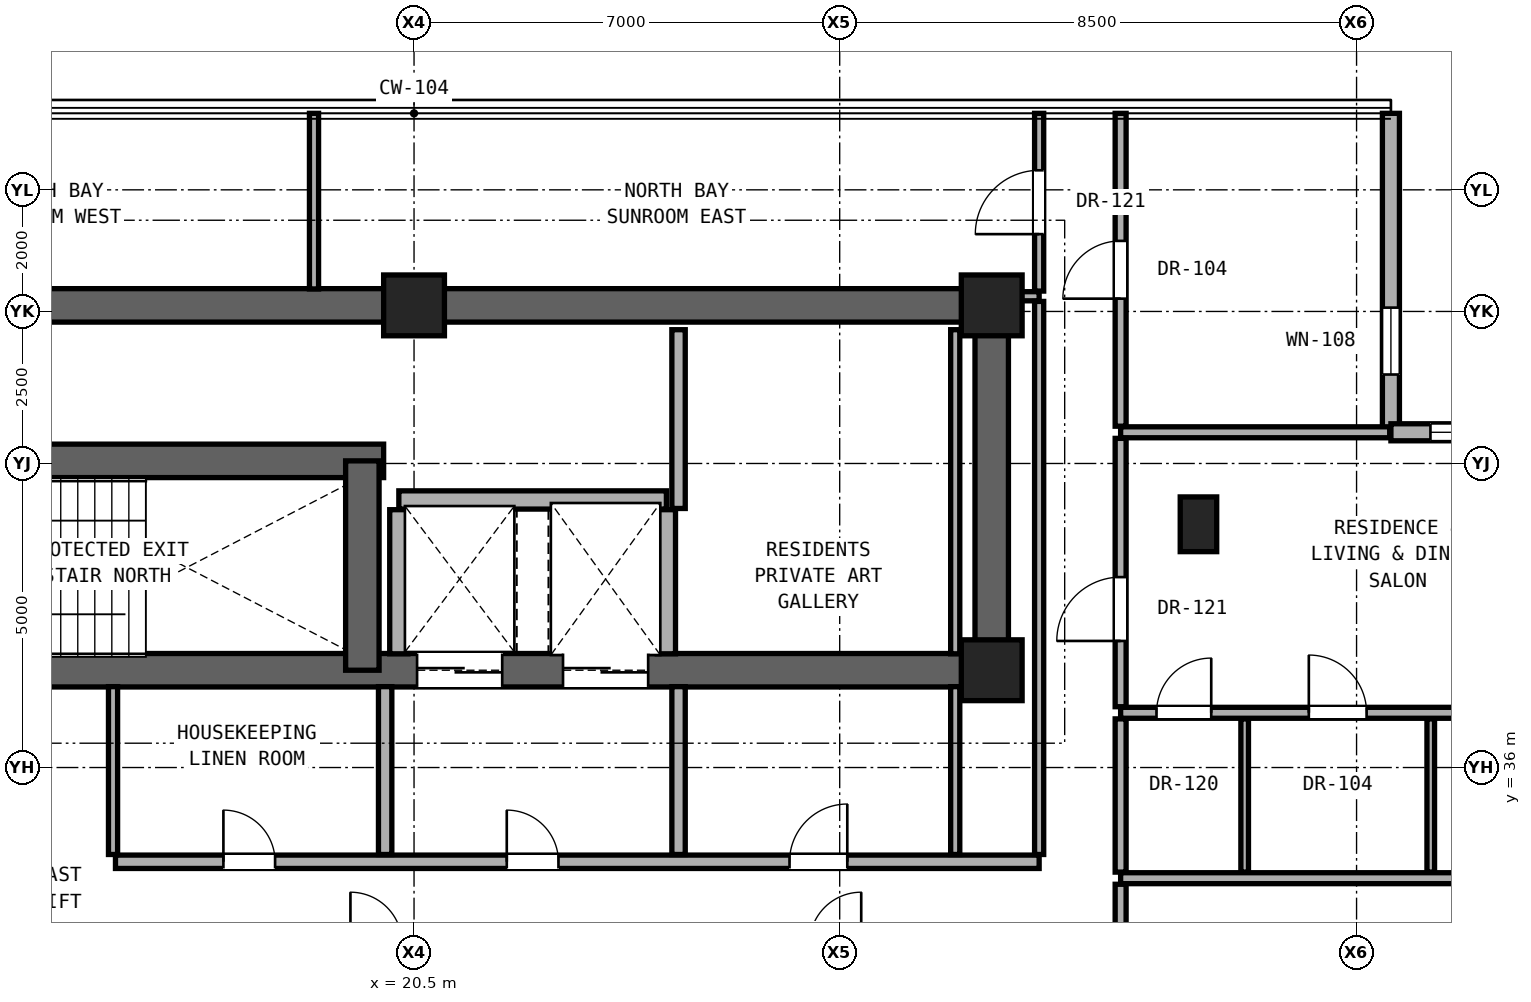
"""IFC4 building model, lengths in metres.
Left out: names, types, materials, properties, quantities, classifications, styles, units other than length and angle.
Written with IfcOpenShell. Run it as: python <this file> out.ifc"""

import sys

from ifc_helpers import new_model, si_unit, direction, frame, frame_2d, origin, origin_2d, place, context, subcontext, project, spatial, rectangle, extrude, element, fill, save


model = new_model("IFC4")
c1 = context("Model", 3, precision=1e-05, world=origin(), true_north=direction((0.0, 1.0)))
c2 = subcontext(c1, "Body", "Model", "MODEL_VIEW")
j1 = project(units=[si_unit("LENGTHUNIT", "METRE"), si_unit("PLANEANGLEUNIT", "RADIAN")], contexts=[c1])
p1 = place(None, origin())
s1 = spatial("IfcSite", under=j1, at=p1, CompositionType="ELEMENT")
p2 = place(p1, origin())
s2 = spatial("IfcBuilding", under=s1, at=p2, CompositionType="ELEMENT")
p3 = place(p2, frame((0.0, 0.0, 173.9)))
s3 = spatial("IfcBuildingStorey", under=s2, at=p3, CompositionType="ELEMENT", Elevation=173.9)
for number, where, z_axis, x_axis in (
    (1, (30.0, 37.6, 0.0), (0.0, 0.0, 1.0), (1.0, 0.0, 0.0)),
    (2, (20.5, 43.6, 0.0), (0.0, 0.0, 1.0), (1.0, 0.0, 0.0)),
    (3, (30.0, 43.6, 0.0), (0.0, 0.0, 1.0), (1.0, 0.0, 0.0)),
):
    element("IfcColumn", number, at=place(p3, frame(where, z_axis=z_axis, x_axis=x_axis)), inside=s3, PredefinedType="COLUMN", context=c2, shape_type="SweptSolid", body=[
        extrude(rectangle(XDim=1.0, YDim=1.0, at=origin_2d()), origin(), (0.0, 0.0, 1.0), 3.25),
    ])
p4 = place(p3, frame((33.4, 40.0, 0.0), z_axis=(0.0, 0.0, 1.0), x_axis=(1.0, 0.0, 0.0)))
e4 = element("IfcColumn", 4, at=p4, inside=s3, PredefinedType="PILASTER", context=c2, shape_type="SweptSolid", body=[
    extrude(rectangle(XDim=0.6, YDim=0.9, at=origin_2d()), origin(), (0.0, 0.0, 1.0), 3.25),
])
p5 = place(p3, frame((11.0, 43.6, 0.0), z_axis=(0.0, 0.0, 1.0), x_axis=(1.0, 0.0, 0.0)))
e5 = element("IfcWall", 5, at=p5, inside=s3, PredefinedType="SHEAR", context=c2, shape_type="SweptSolid", body=[
    extrude(rectangle(XDim=19.0, YDim=0.55, at=frame_2d((9.5, 0.0))), origin(), (0.0, 0.0, 1.0), 3.05),
])
p6 = place(p3, frame((30.0, 37.6, 0.0), z_axis=(0.0, 0.0, 1.0), x_axis=(0.0, 1.0, 0.0)))
e6 = element("IfcWall", 6, at=p6, inside=s3, PredefinedType="SHEAR", context=c2, shape_type="SweptSolid", body=[
    extrude(rectangle(XDim=6.0, YDim=0.55, at=frame_2d((3.0, 0.0))), origin(), (0.0, 0.0, 1.0), 3.05),
])
p7 = place(p3, frame((11.0, 37.6, 0.0), z_axis=(0.0, 0.0, 1.0), x_axis=(1.0, 0.0, 0.0)))
e7 = element("IfcWall", 7, at=p7, inside=s3, PredefinedType="SHEAR", context=c2, shape_type="SweptSolid", body=[
    extrude(rectangle(XDim=19.0, YDim=0.55, at=frame_2d((9.5, 0.0))), origin(), (0.0, 0.0, 1.0), 3.05),
])
p8 = place(p7, frame((1.06, 0.0, 0.0)))
e8 = element("IfcOpeningElement", 8, at=p8, cuts=e7, PredefinedType="OPENING", context=c2, shape_type="SweptSolid", body=[
    extrude(rectangle(XDim=1.15, YDim=2.2, at=frame_2d((0.575, 1.1))), frame((0.0, 0.285, 0.0), z_axis=(0.0, -1.0, 0.0), x_axis=(1.0, 0.0, 0.0)), (0.0, 0.0, 1.0), 0.57),
])
p9 = place(p7, frame((9.55, 0.0, 0.0)))
e9 = element("IfcOpeningElement", 9, at=p9, cuts=e7, PredefinedType="OPENING", context=c2, shape_type="SweptSolid", body=[
    extrude(rectangle(XDim=1.4, YDim=2.35, at=frame_2d((0.7, 1.175))), frame((0.0, 0.285, 0.0), z_axis=(0.0, -1.0, 0.0), x_axis=(1.0, 0.0, 0.0)), (0.0, 0.0, 1.0), 0.57),
])
p10 = place(p7, frame((11.95, 0.0, 0.0)))
e10 = element("IfcOpeningElement", 10, at=p10, cuts=e7, PredefinedType="OPENING", context=c2, shape_type="SweptSolid", body=[
    extrude(rectangle(XDim=1.4, YDim=2.35, at=frame_2d((0.7, 1.175))), frame((0.0, 0.285, 0.0), z_axis=(0.0, -1.0, 0.0), x_axis=(1.0, 0.0, 0.0)), (0.0, 0.0, 1.0), 0.57),
])
p11 = place(p3, frame((11.0, 41.043, 0.0), z_axis=(0.0, 0.0, 1.0), x_axis=(1.0, 0.0, 0.0)))
e11 = element("IfcWall", 11, at=p11, inside=s3, PredefinedType="SHEAR", context=c2, shape_type="SweptSolid", body=[
    extrude(rectangle(XDim=9.0, YDim=0.55, at=frame_2d((4.5, 0.0))), origin(), (0.0, 0.0, 1.0), 3.05),
])
p12 = place(p3, frame((19.65, 37.6, 0.0), z_axis=(0.0, 0.0, 1.0), x_axis=(0.0, 1.0, 0.0)))
e12 = element("IfcWall", 12, at=p12, inside=s3, PredefinedType="SHEAR", context=c2, shape_type="SweptSolid", body=[
    extrude(rectangle(XDim=3.443, YDim=0.55, at=frame_2d((1.721, 0.0))), origin(), (0.0, 0.0, 1.0), 3.05),
])
p13 = place(p3, frame((36.565, 41.513, 0.0), z_axis=(0.0, 0.0, 1.0), x_axis=(0.0, 1.0, 0.0)))
e13 = element("IfcWall", 13, at=p13, inside=s3, PredefinedType="SOLIDWALL", context=c2, shape_type="SweptSolid", body=[
    extrude(rectangle(XDim=5.245, YDim=0.28, at=frame_2d((2.623, 0.0))), origin(), (0.0, 0.0, 1.0), 3.03),
])
p14 = place(p13, frame((0.95, 0.0, 0.85)))
e14 = element("IfcOpeningElement", 14, at=p14, cuts=e13, PredefinedType="OPENING", context=c2, shape_type="SweptSolid", body=[
    extrude(rectangle(XDim=1.1, YDim=2.0, at=frame_2d((0.55, 1.0))), frame((0.0, 0.15, 0.0), z_axis=(0.0, -1.0, 0.0), x_axis=(1.0, 0.0, 0.0)), (0.0, 0.0, 1.0), 0.3),
])
p15 = place(p3, frame((41.81, 41.513, 0.0), z_axis=(0.0, 0.0, 1.0), x_axis=(-1.0, 0.0, 0.0)))
e15 = element("IfcWall", 15, at=p15, inside=s3, PredefinedType="SOLIDWALL", context=c2, shape_type="SweptSolid", body=[
    extrude(rectangle(XDim=5.245, YDim=0.28, at=frame_2d((2.623, 0.0))), origin(), (0.0, 0.0, 1.0), 3.03),
])
p16 = place(p15, frame((3.495, 0.0, 0.85)))
e16 = element("IfcOpeningElement", 16, at=p16, cuts=e15, PredefinedType="OPENING", context=c2, shape_type="SweptSolid", body=[
    extrude(rectangle(XDim=1.1, YDim=2.0, at=frame_2d((0.55, 1.0))), frame((0.0, 0.15, 0.0), z_axis=(0.0, -1.0, 0.0), x_axis=(1.0, 0.0, 0.0)), (0.0, 0.0, 1.0), 0.3),
])
p17 = place(p3, frame((32.12, 34.18, 0.0), z_axis=(0.0, 0.0, 1.0), x_axis=(1.0, 0.0, 0.0)))
e17 = element("IfcWall", 17, at=p17, inside=s3, PredefinedType="PARTITIONING", context=c2, shape_type="SweptSolid", body=[
    extrude(rectangle(XDim=9.69, YDim=0.18, at=frame_2d((4.845, 0.0))), origin(), (0.0, 0.0, 1.0), 2.269),
])
p18 = place(p3, frame((15.59, 34.45, 0.0), z_axis=(0.0, 0.0, 1.0), x_axis=(1.0, 0.0, 0.0)))
e18 = element("IfcWall", 18, at=p18, inside=s3, PredefinedType="SOLIDWALL", context=c2, shape_type="SweptSolid", body=[
    extrude(rectangle(XDim=15.19, YDim=0.22, at=frame_2d((7.595, 0.0))), origin(), (0.0, 0.0, 1.0), 2.186),
])
p19 = place(p18, frame((6.435, 0.0, 0.0)))
e19 = element("IfcOpeningElement", 19, at=p19, cuts=e18, PredefinedType="OPENING", context=c2, shape_type="SweptSolid", body=[
    extrude(rectangle(XDim=0.85, YDim=2.01, at=frame_2d((0.425, 1.005))), frame((0.0, 0.12, 0.0), z_axis=(0.0, -1.0, 0.0), x_axis=(1.0, 0.0, 0.0)), (0.0, 0.0, 1.0), 0.24),
])
p20 = place(p18, frame((11.085, 0.0, 0.0)))
e20 = element("IfcOpeningElement", 20, at=p20, cuts=e18, PredefinedType="OPENING", context=c2, shape_type="SweptSolid", body=[
    extrude(rectangle(XDim=0.95, YDim=2.15, at=frame_2d((0.475, 1.075))), frame((0.0, 0.12, 0.0), z_axis=(0.0, -1.0, 0.0), x_axis=(1.0, 0.0, 0.0)), (0.0, 0.0, 1.0), 0.24),
])
p21 = place(p18, frame((1.775, 0.0, 0.0)))
e21 = element("IfcOpeningElement", 21, at=p21, cuts=e18, PredefinedType="OPENING", context=c2, shape_type="SweptSolid", body=[
    extrude(rectangle(XDim=0.85, YDim=2.01, at=frame_2d((0.425, 1.005))), frame((0.0, 0.12, 0.0), z_axis=(0.0, -1.0, 0.0), x_axis=(1.0, 0.0, 0.0)), (0.0, 0.0, 1.0), 0.24),
])
p22 = place(p3, frame((32.12, 36.9, 0.0), z_axis=(0.0, 0.0, 1.0), x_axis=(1.0, 0.0, 0.0)))
e22 = element("IfcWall", 22, at=p22, inside=s3, PredefinedType="PARTITIONING", context=c2, shape_type="SweptSolid", body=[
    extrude(rectangle(XDim=9.69, YDim=0.18, at=frame_2d((4.845, 0.0))), origin(), (0.0, 0.0, 1.0), 2.269),
])
p23 = place(p22, frame((7.5, 0.0, 0.0)))
e23 = element("IfcOpeningElement", 23, at=p23, cuts=e22, PredefinedType="OPENING", context=c2, shape_type="SweptSolid", body=[
    extrude(rectangle(XDim=0.95, YDim=2.15, at=frame_2d((0.475, 1.075))), frame((0.0, 0.1, 0.0), z_axis=(0.0, -1.0, 0.0), x_axis=(1.0, 0.0, 0.0)), (0.0, 0.0, 1.0), 0.2),
])
p24 = place(p22, frame((3.095, 0.0, 0.0)))
e24 = element("IfcOpeningElement", 24, at=p24, cuts=e22, PredefinedType="OPENING", context=c2, shape_type="SweptSolid", body=[
    extrude(rectangle(XDim=0.95, YDim=2.15, at=frame_2d((0.475, 1.075))), frame((0.0, 0.1, 0.0), z_axis=(0.0, -1.0, 0.0), x_axis=(1.0, 0.0, 0.0)), (0.0, 0.0, 1.0), 0.2),
])
p25 = place(p22, frame((0.59, 0.0, 0.0)))
e25 = element("IfcOpeningElement", 25, at=p25, cuts=e22, PredefinedType="OPENING", context=c2, shape_type="SweptSolid", body=[
    extrude(rectangle(XDim=0.9, YDim=2.1, at=frame_2d((0.45, 1.05))), frame((0.0, 0.1, 0.0), z_axis=(0.0, -1.0, 0.0), x_axis=(1.0, 0.0, 0.0)), (0.0, 0.0, 1.0), 0.2),
])
p26 = place(p3, frame((20.25, 40.4, 0.0), z_axis=(0.0, 0.0, 1.0), x_axis=(1.0, 0.0, 0.0)))
e26 = element("IfcWall", 26, at=p26, inside=s3, PredefinedType="SOLIDWALL", context=c2, shape_type="SweptSolid", body=[
    extrude(rectangle(XDim=4.4, YDim=0.3, at=frame_2d((2.2, 0.0))), origin(), (0.0, 0.0, 1.0), 3.05),
])
p27 = place(p3, frame((32.12, 41.513, 0.0), z_axis=(0.0, 0.0, 1.0), x_axis=(1.0, 0.0, 0.0)))
e27 = element("IfcWall", 27, at=p27, inside=s3, PredefinedType="PARTITIONING", context=c2, shape_type="SweptSolid", body=[
    extrude(rectangle(XDim=4.425, YDim=0.18, at=frame_2d((2.212, 0.0))), origin(), (0.0, 0.0, 1.0), 3.05),
])
p28 = place(p3, frame((30.27, 43.75, 0.0), z_axis=(0.0, 0.0, 1.0), x_axis=(1.0, 0.0, 0.0)))
e28 = element("IfcWall", 28, at=p28, inside=s3, PredefinedType="PARTITIONING", context=c2, shape_type="SweptSolid", body=[
    extrude(rectangle(XDim=0.51, YDim=0.15, at=frame_2d((0.255, 0.0))), origin(), (0.0, 0.0, 1.0), 3.05),
])
p29 = place(p3, frame((15.55, 34.57, 0.0), z_axis=(0.0, 0.0, 1.0), x_axis=(0.0, 1.0, 0.0)))
e29 = element("IfcWall", 29, at=p29, inside=s3, PredefinedType="PARTITIONING", context=c2, shape_type="SweptSolid", body=[
    extrude(rectangle(XDim=2.76, YDim=0.15, at=frame_2d((1.38, 0.0))), origin(), (0.0, 0.0, 1.0), 3.05),
])
p30 = place(p3, frame((18.855, 43.87, 0.0), z_axis=(0.0, 0.0, 1.0), x_axis=(0.0, 1.0, 0.0)))
e30 = element("IfcWall", 30, at=p30, inside=s3, PredefinedType="PARTITIONING", context=c2, shape_type="SweptSolid", body=[
    extrude(rectangle(XDim=2.888, YDim=0.15, at=frame_2d((1.444, 0.0))), origin(), (0.0, 0.0, 1.0), 3.05),
])
p31 = place(p3, frame((20.025, 34.57, 0.0), z_axis=(0.0, 0.0, 1.0), x_axis=(0.0, 1.0, 0.0)))
e31 = element("IfcWall", 31, at=p31, inside=s3, PredefinedType="SOLIDWALL", context=c2, shape_type="SweptSolid", body=[
    extrude(rectangle(XDim=2.76, YDim=0.22, at=frame_2d((1.38, 0.0))), origin(), (0.0, 0.0, 1.0), 3.05),
])
for number, where, z_axis, x_axis in (
    (32, (20.25, 37.87, 0.0), (0.0, 0.0, 1.0), (0.0, 1.0, 0.0)),
    (33, (24.65, 37.87, 0.0), (0.0, 0.0, 1.0), (0.0, 1.0, 0.0)),
):
    element("IfcWall", number, at=place(p3, frame(where, z_axis=z_axis, x_axis=x_axis)), inside=s3, PredefinedType="SOLIDWALL", context=c2, shape_type="SweptSolid", body=[
        extrude(rectangle(XDim=2.37, YDim=0.3, at=frame_2d((1.185, 0.0))), origin(), (0.0, 0.0, 1.0), 3.05),
    ])
p32 = place(p3, frame((24.85, 34.57, 0.0), z_axis=(0.0, 0.0, 1.0), x_axis=(0.0, 1.0, 0.0)))
e34 = element("IfcWall", 34, at=p32, inside=s3, PredefinedType="SOLIDWALL", context=c2, shape_type="SweptSolid", body=[
    extrude(rectangle(XDim=2.76, YDim=0.22, at=frame_2d((1.38, 0.0))), origin(), (0.0, 0.0, 1.0), 3.05),
])
p33 = place(p3, frame((24.85, 40.26, 0.0), z_axis=(0.0, 0.0, 1.0), x_axis=(0.0, 1.0, 0.0)))
e35 = element("IfcWall", 35, at=p33, inside=s3, PredefinedType="SOLIDWALL", context=c2, shape_type="SweptSolid", body=[
    extrude(rectangle(XDim=2.94, YDim=0.22, at=frame_2d((1.47, 0.0))), origin(), (0.0, 0.0, 1.0), 3.05),
])
p34 = place(p3, frame((29.4, 34.57, 0.0), z_axis=(0.0, 0.0, 1.0), x_axis=(0.0, 1.0, 0.0)))
e36 = element("IfcWall", 36, at=p34, inside=s3, PredefinedType="PARTITIONING", context=c2, shape_type="SweptSolid", body=[
    extrude(rectangle(XDim=2.76, YDim=0.15, at=frame_2d((1.38, 0.0))), origin(), (0.0, 0.0, 1.0), 3.05),
])
p35 = place(p3, frame((29.4, 37.87, 0.0), z_axis=(0.0, 0.0, 1.0), x_axis=(0.0, 1.0, 0.0)))
e37 = element("IfcWall", 37, at=p35, inside=s3, PredefinedType="PARTITIONING", context=c2, shape_type="SweptSolid", body=[
    extrude(rectangle(XDim=5.33, YDim=0.15, at=frame_2d((2.665, 0.0))), origin(), (0.0, 0.0, 1.0), 3.05),
])
p36 = place(p3, frame((30.78, 34.57, 0.0), z_axis=(0.0, 0.0, 1.0), x_axis=(0.0, 1.0, 0.0)))
e38 = element("IfcWall", 38, at=p36, inside=s3, PredefinedType="PARTITIONING", context=c2, shape_type="SweptSolid", body=[
    extrude(rectangle(XDim=9.095, YDim=0.15, at=frame_2d((4.547, 0.0))), origin(), (0.0, 0.0, 1.0), 2.442),
])
p37 = place(p3, frame((30.78, 43.835, 0.0), z_axis=(0.0, 0.0, 1.0), x_axis=(0.0, 1.0, 0.0)))
e39 = element("IfcWall", 39, at=p37, inside=s3, PredefinedType="PARTITIONING", context=c2, shape_type="SweptSolid", body=[
    extrude(rectangle(XDim=2.923, YDim=0.15, at=frame_2d((1.461, 0.0))), origin(), (0.0, 0.0, 1.0), 3.05),
])
p38 = place(p37, frame((0.937, 0.0, 0.0)))
e40 = element("IfcOpeningElement", 40, at=p38, cuts=e39, PredefinedType="OPENING", context=c2, shape_type="SweptSolid", body=[
    extrude(rectangle(XDim=1.05, YDim=2.2, at=frame_2d((0.525, 1.1))), frame((0.0, 0.085, 0.0), z_axis=(0.0, -1.0, 0.0), x_axis=(1.0, 0.0, 0.0)), (0.0, 0.0, 1.0), 0.17),
])
p39 = place(p3, frame((32.12, 30.633, 0.0), z_axis=(0.0, 0.0, 1.0), x_axis=(0.0, 1.0, 0.0)))
e41 = element("IfcWall", 41, at=p39, inside=s3, PredefinedType="PARTITIONING", context=c2, shape_type="SweptSolid", body=[
    extrude(rectangle(XDim=3.447, YDim=0.18, at=frame_2d((1.724, 0.0))), origin(), (0.0, 0.0, 1.0), 2.346),
])
p40 = place(p39, frame((1.198, 0.0, 0.0)))
e42 = element("IfcOpeningElement", 42, at=p40, cuts=e41, PredefinedType="OPENING", context=c2, shape_type="SweptSolid", body=[
    extrude(rectangle(XDim=1.05, YDim=2.2, at=frame_2d((0.525, 1.1))), frame((0.0, 0.1, 0.0), z_axis=(0.0, -1.0, 0.0), x_axis=(1.0, 0.0, 0.0)), (0.0, 0.0, 1.0), 0.2),
])
p41 = place(p3, frame((32.12, 34.28, 0.0), z_axis=(0.0, 0.0, 1.0), x_axis=(0.0, 1.0, 0.0)))
e43 = element("IfcWall", 43, at=p41, inside=s3, PredefinedType="PARTITIONING", context=c2, shape_type="SweptSolid", body=[
    extrude(rectangle(XDim=2.52, YDim=0.18, at=frame_2d((1.26, 0.0))), origin(), (0.0, 0.0, 1.0), 3.05),
])
p42 = place(p3, frame((32.12, 37.0, 0.0), z_axis=(0.0, 0.0, 1.0), x_axis=(0.0, 1.0, 0.0)))
e44 = element("IfcWall", 44, at=p42, inside=s3, PredefinedType="PARTITIONING", context=c2, shape_type="SweptSolid", body=[
    extrude(rectangle(XDim=4.413, YDim=0.18, at=frame_2d((2.207, 0.0))), origin(), (0.0, 0.0, 1.0), 2.442),
])
p43 = place(p42, frame((1.082, 0.0, 0.0)))
e45 = element("IfcOpeningElement", 45, at=p43, cuts=e44, PredefinedType="OPENING", context=c2, shape_type="SweptSolid", body=[
    extrude(rectangle(XDim=1.05, YDim=2.2, at=frame_2d((0.525, 1.1))), frame((0.0, 0.1, 0.0), z_axis=(0.0, -1.0, 0.0), x_axis=(1.0, 0.0, 0.0)), (0.0, 0.0, 1.0), 0.2),
])
p44 = place(p3, frame((32.12, 41.613, 0.0), z_axis=(0.0, 0.0, 1.0), x_axis=(0.0, 1.0, 0.0)))
e46 = element("IfcWall", 46, at=p44, inside=s3, PredefinedType="PARTITIONING", context=c2, shape_type="SweptSolid", body=[
    extrude(rectangle(XDim=5.145, YDim=0.18, at=frame_2d((2.573, 0.0))), origin(), (0.0, 0.0, 1.0), 3.05),
])
p45 = place(p44, frame((2.097, 0.0, 0.0)))
e47 = element("IfcOpeningElement", 47, at=p45, cuts=e46, PredefinedType="OPENING", context=c2, shape_type="SweptSolid", body=[
    extrude(rectangle(XDim=0.95, YDim=2.15, at=frame_2d((0.475, 1.075))), frame((0.0, 0.1, 0.0), z_axis=(0.0, -1.0, 0.0), x_axis=(1.0, 0.0, 0.0)), (0.0, 0.0, 1.0), 0.2),
])
for number, where, z_axis, x_axis in (
    (48, (34.16, 34.28, 0.0), (0.0, 0.0, 1.0), (0.0, 1.0, 0.0)),
    (49, (37.22, 34.28, 0.0), (0.0, 0.0, 1.0), (0.0, 1.0, 0.0)),
):
    element("IfcWall", number, at=place(p3, frame(where, z_axis=z_axis, x_axis=x_axis)), inside=s3, PredefinedType="PARTITIONING", context=c2, shape_type="SweptSolid", body=[
        extrude(rectangle(XDim=2.52, YDim=0.125, at=frame_2d((1.26, 0.0))), origin(), (0.0, 0.0, 1.0), 3.05),
    ])
p46 = place(p14, origin())
e50 = element("IfcWindow", 50, at=p46, inside=s3, PartitioningType="SINGLE_PANEL", PredefinedType="WINDOW", context=c2, shape_type="SweptSolid", body=[
    extrude(rectangle(XDim=1.1, YDim=2.0, at=frame_2d((0.55, 1.0))), frame((0.0, 0.03, 0.0), z_axis=(0.0, -1.0, 0.0), x_axis=(1.0, 0.0, 0.0)), (0.0, 0.0, 1.0), 0.06),
])
fill(e14, e50)
p47 = place(p16, origin())
e51 = element("IfcWindow", 51, at=p47, inside=s3, PartitioningType="SINGLE_PANEL", PredefinedType="WINDOW", context=c2, shape_type="SweptSolid", body=[
    extrude(rectangle(XDim=1.1, YDim=2.0, at=frame_2d((0.55, 1.0))), frame((0.0, 0.03, 0.0), z_axis=(0.0, -1.0, 0.0), x_axis=(1.0, 0.0, 0.0)), (0.0, 0.0, 1.0), 0.06),
])
fill(e16, e51)
p48 = place(p19, origin())
e52 = element("IfcDoor", 52, at=p48, inside=s3, OperationType="SINGLE_SWING_LEFT", PredefinedType="DOOR", context=c2, shape_type="SweptSolid", body=[
    extrude(rectangle(XDim=0.85, YDim=2.01, at=frame_2d((0.425, 1.005))), frame((0.0, 0.025, 0.0), z_axis=(0.0, -1.0, 0.0), x_axis=(1.0, 0.0, 0.0)), (0.0, 0.0, 1.0), 0.05),
])
fill(e19, e52)
p49 = place(p20, origin())
e53 = element("IfcDoor", 53, at=p49, inside=s3, OperationType="SINGLE_SWING_RIGHT", PredefinedType="DOOR", context=c2, shape_type="SweptSolid", body=[
    extrude(rectangle(XDim=0.95, YDim=2.15, at=frame_2d((0.475, 1.075))), frame((0.0, 0.025, 0.0), z_axis=(0.0, -1.0, 0.0), x_axis=(1.0, 0.0, 0.0)), (0.0, 0.0, 1.0), 0.05),
])
fill(e20, e53)
p50 = place(p21, origin())
e54 = element("IfcDoor", 54, at=p50, inside=s3, OperationType="SINGLE_SWING_LEFT", PredefinedType="DOOR", context=c2, shape_type="SweptSolid", body=[
    extrude(rectangle(XDim=0.85, YDim=2.01, at=frame_2d((0.425, 1.005))), frame((0.0, 0.025, 0.0), z_axis=(0.0, -1.0, 0.0), x_axis=(1.0, 0.0, 0.0)), (0.0, 0.0, 1.0), 0.05),
])
fill(e21, e54)
p51 = place(p43, origin())
e55 = element("IfcDoor", 55, at=p51, inside=s3, OperationType="SINGLE_SWING_LEFT", PredefinedType="DOOR", context=c2, shape_type="SweptSolid", body=[
    extrude(rectangle(XDim=1.05, YDim=2.2, at=frame_2d((0.525, 1.1))), frame((0.0, 0.025, 0.0), z_axis=(0.0, -1.0, 0.0), x_axis=(1.0, 0.0, 0.0)), (0.0, 0.0, 1.0), 0.05),
])
fill(e45, e55)
p52 = place(p24, origin())
e56 = element("IfcDoor", 56, at=p52, inside=s3, OperationType="SINGLE_SWING_LEFT", PredefinedType="DOOR", context=c2, shape_type="SweptSolid", body=[
    extrude(rectangle(XDim=0.95, YDim=2.15, at=frame_2d((0.475, 1.075))), frame((0.0, 0.025, 0.0), z_axis=(0.0, -1.0, 0.0), x_axis=(1.0, 0.0, 0.0)), (0.0, 0.0, 1.0), 0.05),
])
fill(e24, e56)
p53 = place(p25, origin())
e57 = element("IfcDoor", 57, at=p53, inside=s3, OperationType="SINGLE_SWING_RIGHT", PredefinedType="DOOR", context=c2, shape_type="SweptSolid", body=[
    extrude(rectangle(XDim=0.9, YDim=2.1, at=frame_2d((0.45, 1.05))), frame((0.0, 0.025, 0.0), z_axis=(0.0, -1.0, 0.0), x_axis=(1.0, 0.0, 0.0)), (0.0, 0.0, 1.0), 0.05),
])
fill(e25, e57)
p54 = place(p38, origin())
e58 = element("IfcDoor", 58, at=p54, inside=s3, OperationType="SINGLE_SWING_LEFT", PredefinedType="DOOR", context=c2, shape_type="SweptSolid", body=[
    extrude(rectangle(XDim=1.05, YDim=2.2, at=frame_2d((0.525, 1.1))), frame((0.0, 0.025, 0.0), z_axis=(0.0, -1.0, 0.0), x_axis=(1.0, 0.0, 0.0)), (0.0, 0.0, 1.0), 0.05),
])
fill(e40, e58)
p55 = place(p45, origin())
e59 = element("IfcDoor", 59, at=p55, inside=s3, OperationType="SINGLE_SWING_LEFT", PredefinedType="DOOR", context=c2, shape_type="SweptSolid", body=[
    extrude(rectangle(XDim=0.95, YDim=2.15, at=frame_2d((0.475, 1.075))), frame((0.0, 0.025, 0.0), z_axis=(0.0, -1.0, 0.0), x_axis=(1.0, 0.0, 0.0)), (0.0, 0.0, 1.0), 0.05),
])
fill(e47, e59)
p56 = place(p9, origin())
e60 = element("IfcDoor", 60, at=p56, inside=s3, OperationType="DOUBLE_DOOR_SLIDING", PredefinedType="DOOR", context=c2, shape_type="SweptSolid", body=[
    extrude(rectangle(XDim=1.4, YDim=2.35, at=frame_2d((0.7, 1.175))), frame((0.0, 0.025, 0.0), z_axis=(0.0, -1.0, 0.0), x_axis=(1.0, 0.0, 0.0)), (0.0, 0.0, 1.0), 0.05),
])
fill(e9, e60)
p57 = place(p10, origin())
e61 = element("IfcDoor", 61, at=p57, inside=s3, OperationType="DOUBLE_DOOR_SLIDING", PredefinedType="DOOR", context=c2, shape_type="SweptSolid", body=[
    extrude(rectangle(XDim=1.4, YDim=2.35, at=frame_2d((0.7, 1.175))), frame((0.0, 0.025, 0.0), z_axis=(0.0, -1.0, 0.0), x_axis=(1.0, 0.0, 0.0)), (0.0, 0.0, 1.0), 0.05),
])
fill(e10, e61)
save(model, sys.argv[1])
